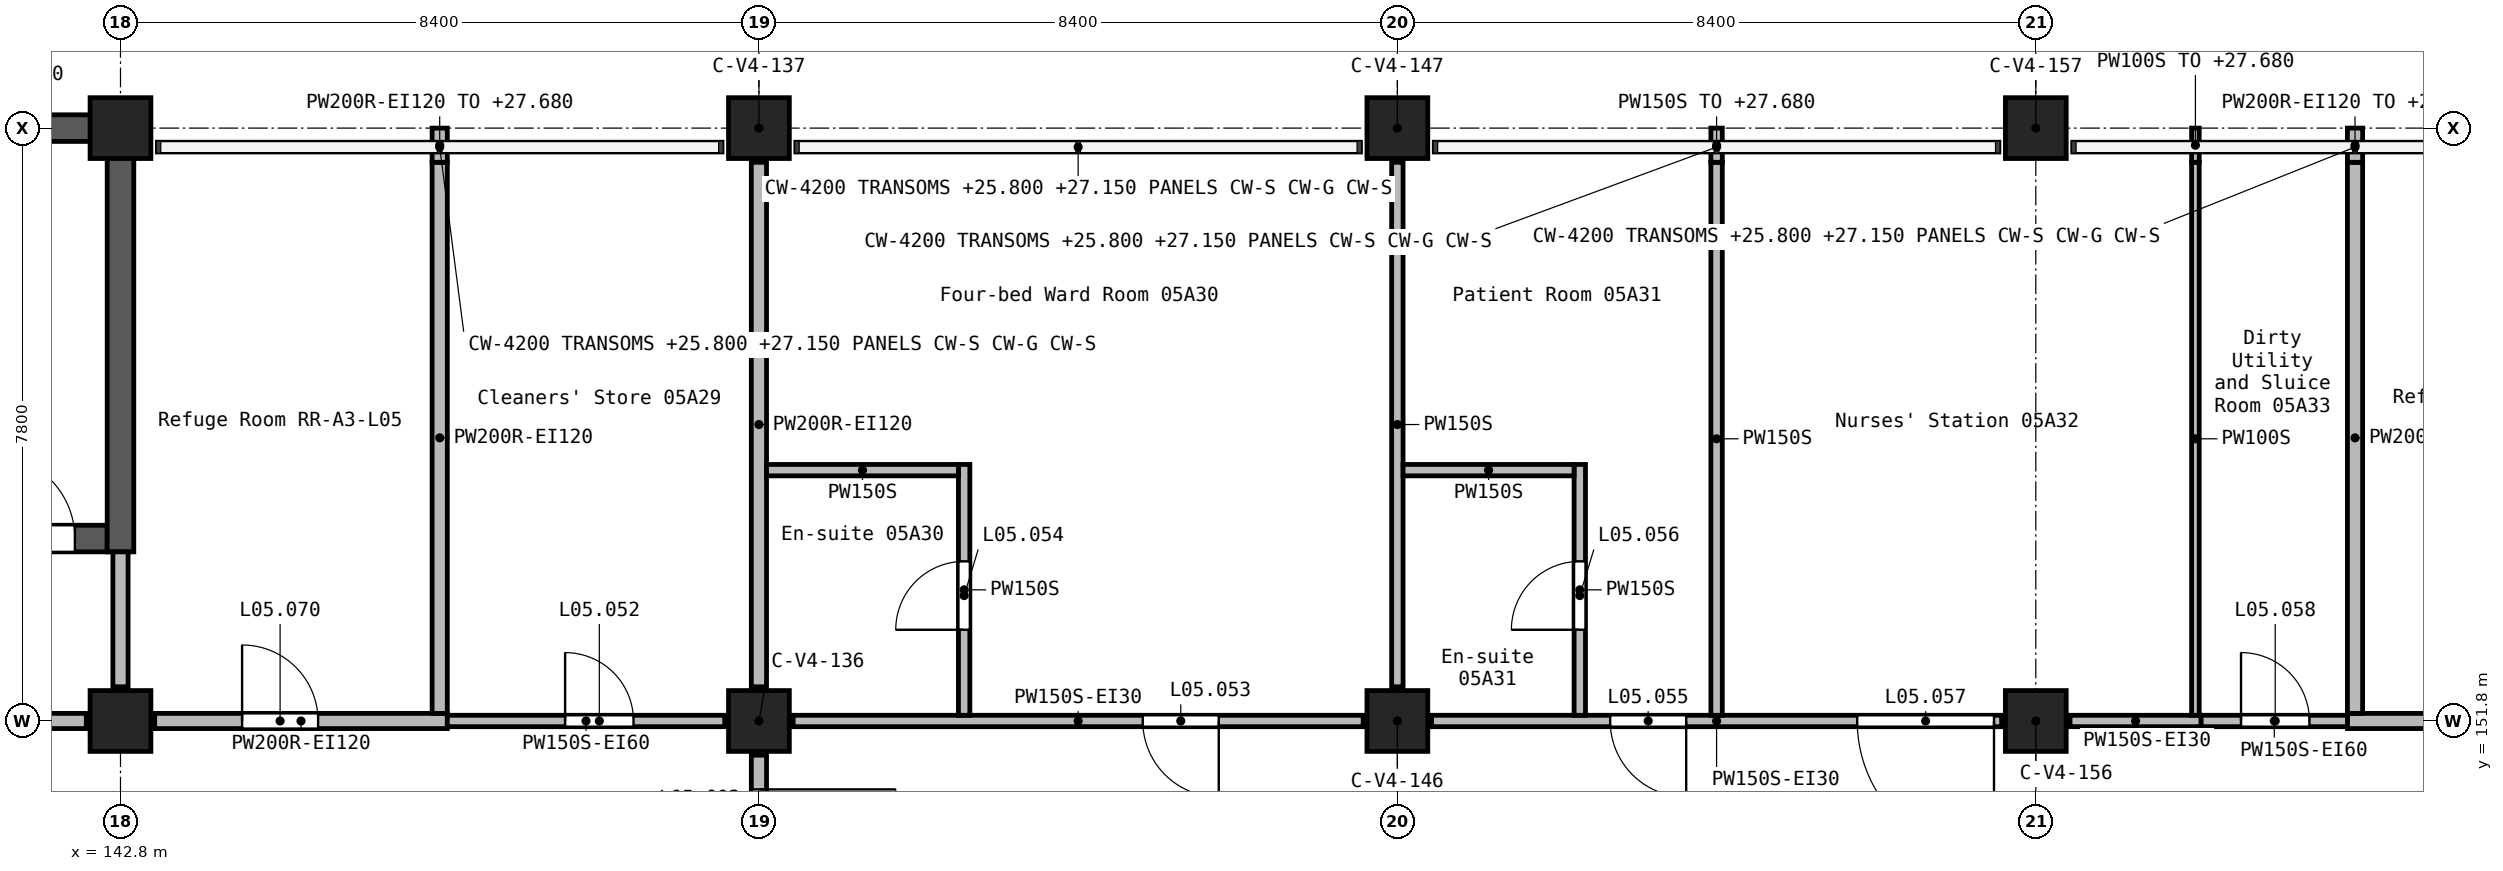
"""IFC4 building model, lengths in metres.
Left out: names, types, materials, properties, quantities, classifications, styles, units other than length and angle.
Written with IfcOpenShell. Run it as: python <this file> out.ifc"""

import sys

from ifc_helpers import new_model, si_unit, direction, frame, frame_2d, origin, origin_2d, place, context, subcontext, project, spatial, rectangle, extrude, element, fill, save


model = new_model("IFC4")
c1 = context("Model", 3, precision=1e-05, world=origin(), true_north=direction((0.0, 1.0)))
c2 = subcontext(c1, "Body", "Model", "MODEL_VIEW")
j1 = project(units=[si_unit("LENGTHUNIT", "METRE"), si_unit("PLANEANGLEUNIT", "RADIAN")], contexts=[c1])
p1 = place(None, origin())
s1 = spatial("IfcSite", under=j1, at=p1, CompositionType="ELEMENT")
p2 = place(p1, origin())
s2 = spatial("IfcBuilding", under=s1, at=p2, CompositionType="ELEMENT")
p3 = place(p2, frame((0.0, 0.0, 24.9)))
s3 = spatial("IfcBuildingStorey", under=s2, at=p3, CompositionType="ELEMENT", Elevation=24.9)
for number, where, z_axis, x_axis in (
    (1, (142.8, 151.8, 0.0), (0.0, 0.0, 1.0), (1.0, 0.0, 0.0)),
    (2, (142.8, 159.6, 0.0), (0.0, 0.0, 1.0), (1.0, 0.0, 0.0)),
    (3, (151.2, 151.8, 0.0), (0.0, 0.0, 1.0), (1.0, 0.0, 0.0)),
    (4, (151.2, 159.6, 0.0), (0.0, 0.0, 1.0), (1.0, 0.0, 0.0)),
    (5, (159.6, 151.8, 0.0), (0.0, 0.0, 1.0), (1.0, 0.0, 0.0)),
    (6, (159.6, 159.6, 0.0), (0.0, 0.0, 1.0), (1.0, 0.0, 0.0)),
    (7, (168.0, 151.8, 0.0), (0.0, 0.0, 1.0), (1.0, 0.0, 0.0)),
    (8, (168.0, 159.6, 0.0), (0.0, 0.0, 1.0), (1.0, 0.0, 0.0)),
):
    element("IfcColumn", number, at=place(p3, frame(where, z_axis=z_axis, x_axis=x_axis)), inside=s3, PredefinedType="COLUMN", context=c2, shape_type="SweptSolid", body=[
        extrude(rectangle(XDim=0.8, YDim=0.8, at=origin_2d()), origin(), (0.0, 0.0, 1.0), 3.9),
    ])
p4 = place(p3, frame((134.225, 159.6, 0.0), z_axis=(0.0, 0.0, 1.0), x_axis=(1.0, 0.0, 0.0)))
e9 = element("IfcWall", 9, at=p4, inside=s3, PredefinedType="SHEAR", context=c2, shape_type="SweptSolid", body=[
    extrude(rectangle(XDim=8.4, YDim=0.35, at=frame_2d((4.2, 0.0))), origin(), (0.0, 0.0, 1.0), 3.9),
])
p5 = place(p3, frame((134.575, 154.2, 0.0), z_axis=(0.0, 0.0, 1.0), x_axis=(1.0, 0.0, 0.0)))
e10 = element("IfcWall", 10, at=p5, inside=s3, PredefinedType="SHEAR", context=c2, shape_type="SweptSolid", body=[
    extrude(rectangle(XDim=8.05, YDim=0.35, at=frame_2d((4.025, 0.0))), origin(), (0.0, 0.0, 1.0), 3.9),
])
p6 = place(p5, frame((6.525, 0.0, 0.0)))
e11 = element("IfcOpeningElement", 11, at=p6, cuts=e10, PredefinedType="OPENING", context=c2, shape_type="SweptSolid", body=[
    extrude(rectangle(XDim=1.1, YDim=2.1, at=frame_2d((0.55, 1.05))), frame((0.0, 0.185, 0.0), z_axis=(0.0, -1.0, 0.0), x_axis=(1.0, 0.0, 0.0)), (0.0, 0.0, 1.0), 0.37),
])
p7 = place(p3, frame((142.8, 154.025, 0.0), z_axis=(0.0, 0.0, 1.0), x_axis=(0.0, 1.0, 0.0)))
e12 = element("IfcWall", 12, at=p7, inside=s3, PredefinedType="SHEAR", context=c2, shape_type="SweptSolid", body=[
    extrude(rectangle(XDim=5.75, YDim=0.35, at=frame_2d((2.875, 0.0))), origin(), (0.0, 0.0, 1.0), 3.9),
])
p8 = place(p3, frame((151.2, 159.15, 0.0), z_axis=(0.0, 0.0, 1.0), x_axis=(0.0, -1.0, 0.0)))
e13 = element("IfcWall", 13, at=p8, inside=s3, PredefinedType="SOLIDWALL", context=c2, shape_type="SweptSolid", body=[
    extrude(rectangle(XDim=6.9, YDim=0.2, at=frame_2d((3.45, 0.0))), origin(), (0.0, 0.0, 1.0), 3.6),
])
p9 = place(p3, frame((151.2, 151.35, 0.0), z_axis=(0.0, 0.0, 1.0), x_axis=(0.0, -1.0, 0.0)))
e14 = element("IfcWall", 14, at=p9, inside=s3, PredefinedType="SOLIDWALL", context=c2, shape_type="SweptSolid", body=[
    extrude(rectangle(XDim=2.7, YDim=0.2, at=frame_2d((1.35, 0.0))), origin(), (0.0, 0.0, 1.0), 3.6),
])
p10 = place(p9, frame((0.45, 0.0, 0.0)))
e15 = element("IfcOpeningElement", 15, at=p10, cuts=e14, PredefinedType="OPENING", context=c2, shape_type="SweptSolid", body=[
    extrude(rectangle(XDim=1.8, YDim=2.1, at=frame_2d((0.9, 1.05))), frame((0.0, 0.11, 0.0), z_axis=(0.0, -1.0, 0.0), x_axis=(1.0, 0.0, 0.0)), (0.0, 0.0, 1.0), 0.22),
])
p11 = place(p3, frame((172.1, 151.8, 0.0), z_axis=(0.0, 0.0, 1.0), x_axis=(1.0, 0.0, 0.0)))
e16 = element("IfcWall", 16, at=p11, inside=s3, PredefinedType="SOLIDWALL", context=c2, shape_type="SweptSolid", body=[
    extrude(rectangle(XDim=3.85, YDim=0.2, at=frame_2d((1.925, 0.0))), origin(), (0.0, 0.0, 1.0), 3.6),
])
p12 = place(p11, frame((1.7, 0.0, 0.0)))
e17 = element("IfcOpeningElement", 17, at=p12, cuts=e16, PredefinedType="OPENING", context=c2, shape_type="SweptSolid", body=[
    extrude(rectangle(XDim=1.0, YDim=2.1, at=frame_2d((0.5, 1.05))), frame((0.0, 0.11, 0.0), z_axis=(0.0, -1.0, 0.0), x_axis=(1.0, 0.0, 0.0)), (0.0, 0.0, 1.0), 0.22),
])
p13 = place(p3, frame((134.85, 151.8, 0.0), z_axis=(0.0, 0.0, 1.0), x_axis=(1.0, 0.0, 0.0)))
e18 = element("IfcWall", 18, at=p13, inside=s3, PredefinedType="SOLIDWALL", context=c2, shape_type="SweptSolid", body=[
    extrude(rectangle(XDim=7.5, YDim=0.2, at=frame_2d((3.75, 0.0))), origin(), (0.0, 0.0, 1.0), 3.6),
])
p14 = place(p13, frame((3.2, 0.0, 0.0)))
e19 = element("IfcOpeningElement", 19, at=p14, cuts=e18, PredefinedType="OPENING", context=c2, shape_type="SweptSolid", body=[
    extrude(rectangle(XDim=1.1, YDim=2.1, at=frame_2d((0.55, 1.05))), frame((0.0, 0.11, 0.0), z_axis=(0.0, -1.0, 0.0), x_axis=(1.0, 0.0, 0.0)), (0.0, 0.0, 1.0), 0.22),
])
p15 = place(p3, frame((143.25, 151.8, 0.0), z_axis=(0.0, 0.0, 1.0), x_axis=(1.0, 0.0, 0.0)))
e20 = element("IfcWall", 20, at=p15, inside=s3, PredefinedType="SOLIDWALL", context=c2, shape_type="SweptSolid", body=[
    extrude(rectangle(XDim=3.85, YDim=0.2, at=frame_2d((1.925, 0.0))), origin(), (0.0, 0.0, 1.0), 3.6),
])
p16 = place(p15, frame((1.15, 0.0, 0.0)))
e21 = element("IfcOpeningElement", 21, at=p16, cuts=e20, PredefinedType="OPENING", context=c2, shape_type="SweptSolid", body=[
    extrude(rectangle(XDim=1.0, YDim=2.1, at=frame_2d((0.5, 1.05))), frame((0.0, 0.11, 0.0), z_axis=(0.0, -1.0, 0.0), x_axis=(1.0, 0.0, 0.0)), (0.0, 0.0, 1.0), 0.22),
])
p17 = place(p3, frame((142.8, 152.25, 0.0), z_axis=(0.0, 0.0, 1.0), x_axis=(0.0, 1.0, 0.0)))
e22 = element("IfcWall", 22, at=p17, inside=s3, PredefinedType="SOLIDWALL", context=c2, shape_type="SweptSolid", body=[
    extrude(rectangle(XDim=1.775, YDim=0.2, at=frame_2d((0.887, 0.0))), origin(), (0.0, 0.0, 1.0), 3.6),
])
p18 = place(p3, frame((147.0, 151.9, 0.0), z_axis=(0.0, 0.0, 1.0), x_axis=(0.0, 1.0, 0.0)))
e23 = element("IfcWall", 23, at=p18, inside=s3, PredefinedType="SOLIDWALL", context=c2, shape_type="SweptSolid", body=[
    extrude(rectangle(XDim=7.25, YDim=0.2, at=frame_2d((3.625, 0.0))), origin(), (0.0, 0.0, 1.0), 3.6),
])
p19 = place(p3, frame((147.0, 159.15, 0.0), z_axis=(0.0, 0.0, 1.0), x_axis=(0.0, 1.0, 0.0)))
e24 = element("IfcWall", 24, at=p19, inside=s3, PredefinedType="SOLIDWALL", context=c2, shape_type="SweptSolid", body=[
    extrude(rectangle(XDim=0.45, YDim=0.2, at=frame_2d((0.225, 0.0))), origin(), (0.0, 0.0, 1.0), 2.78),
])
p20 = place(p3, frame((172.2, 151.9, 0.0), z_axis=(0.0, 0.0, 1.0), x_axis=(0.0, 1.0, 0.0)))
e25 = element("IfcWall", 25, at=p20, inside=s3, PredefinedType="SOLIDWALL", context=c2, shape_type="SweptSolid", body=[
    extrude(rectangle(XDim=7.25, YDim=0.2, at=frame_2d((3.625, 0.0))), origin(), (0.0, 0.0, 1.0), 3.6),
])
p21 = place(p3, frame((172.2, 159.15, 0.0), z_axis=(0.0, 0.0, 1.0), x_axis=(0.0, 1.0, 0.0)))
e26 = element("IfcWall", 26, at=p21, inside=s3, PredefinedType="SOLIDWALL", context=c2, shape_type="SweptSolid", body=[
    extrude(rectangle(XDim=0.45, YDim=0.2, at=frame_2d((0.225, 0.0))), origin(), (0.0, 0.0, 1.0), 2.78),
])
p22 = place(p3, frame((170.175, 151.8, 0.0), z_axis=(0.0, 0.0, 1.0), x_axis=(-1.0, 0.0, 0.0)))
e27 = element("IfcWall", 27, at=p22, inside=s3, PredefinedType="PARTITIONING", context=c2, shape_type="SweptSolid", body=[
    extrude(rectangle(XDim=1.725, YDim=0.15, at=frame_2d((0.863, 0.0))), origin(), (0.0, 0.0, 1.0), 3.6),
])
p23 = place(p3, frame((167.55, 151.8, 0.0), z_axis=(0.0, 0.0, 1.0), x_axis=(-1.0, 0.0, 0.0)))
e28 = element("IfcWall", 28, at=p23, inside=s3, PredefinedType="PARTITIONING", context=c2, shape_type="SweptSolid", body=[
    extrude(rectangle(XDim=7.5, YDim=0.15, at=frame_2d((3.75, 0.0))), origin(), (0.0, 0.0, 1.0), 3.6),
])
p24 = place(p23, frame((4.15, 0.0, 0.0)))
e29 = element("IfcOpeningElement", 29, at=p24, cuts=e28, PredefinedType="OPENING", context=c2, shape_type="SweptSolid", body=[
    extrude(rectangle(XDim=1.0, YDim=2.1, at=frame_2d((0.5, 1.05))), frame((0.0, 0.085, 0.0), z_axis=(0.0, -1.0, 0.0), x_axis=(1.0, 0.0, 0.0)), (0.0, 0.0, 1.0), 0.17),
])
p25 = place(p23, frame((0.1, 0.0, 0.0)))
e30 = element("IfcOpeningElement", 30, at=p25, cuts=e28, PredefinedType="OPENING", context=c2, shape_type="SweptSolid", body=[
    extrude(rectangle(XDim=1.8, YDim=2.1, at=frame_2d((0.9, 1.05))), frame((0.0, 0.085, 0.0), z_axis=(0.0, -1.0, 0.0), x_axis=(1.0, 0.0, 0.0)), (0.0, 0.0, 1.0), 0.17),
])
p26 = place(p3, frame((159.15, 151.8, 0.0), z_axis=(0.0, 0.0, 1.0), x_axis=(-1.0, 0.0, 0.0)))
e31 = element("IfcWall", 31, at=p26, inside=s3, PredefinedType="PARTITIONING", context=c2, shape_type="SweptSolid", body=[
    extrude(rectangle(XDim=7.5, YDim=0.15, at=frame_2d((3.75, 0.0))), origin(), (0.0, 0.0, 1.0), 3.6),
])
p27 = place(p26, frame((1.9, 0.0, 0.0)))
e32 = element("IfcOpeningElement", 32, at=p27, cuts=e31, PredefinedType="OPENING", context=c2, shape_type="SweptSolid", body=[
    extrude(rectangle(XDim=1.0, YDim=2.1, at=frame_2d((0.5, 1.05))), frame((0.0, 0.085, 0.0), z_axis=(0.0, -1.0, 0.0), x_axis=(1.0, 0.0, 0.0)), (0.0, 0.0, 1.0), 0.17),
])
p28 = place(p3, frame((147.1, 151.8, 0.0), z_axis=(0.0, 0.0, 1.0), x_axis=(1.0, 0.0, 0.0)))
e33 = element("IfcWall", 33, at=p28, inside=s3, PredefinedType="PARTITIONING", context=c2, shape_type="SweptSolid", body=[
    extrude(rectangle(XDim=3.65, YDim=0.15, at=frame_2d((1.825, 0.0))), origin(), (0.0, 0.0, 1.0), 3.6),
])
p29 = place(p28, frame((1.55, 0.0, 0.0)))
e34 = element("IfcOpeningElement", 34, at=p29, cuts=e33, PredefinedType="OPENING", context=c2, shape_type="SweptSolid", body=[
    extrude(rectangle(XDim=0.9, YDim=2.1, at=frame_2d((0.45, 1.05))), frame((0.0, 0.085, 0.0), z_axis=(0.0, -1.0, 0.0), x_axis=(1.0, 0.0, 0.0)), (0.0, 0.0, 1.0), 0.17),
])
p30 = place(p3, frame((170.175, 151.8, 0.0), z_axis=(0.0, 0.0, 1.0), x_axis=(1.0, 0.0, 0.0)))
e35 = element("IfcWall", 35, at=p30, inside=s3, PredefinedType="PARTITIONING", context=c2, shape_type="SweptSolid", body=[
    extrude(rectangle(XDim=1.925, YDim=0.15, at=frame_2d((0.962, 0.0))), origin(), (0.0, 0.0, 1.0), 3.6),
])
p31 = place(p30, frame((0.525, 0.0, 0.0)))
e36 = element("IfcOpeningElement", 36, at=p31, cuts=e35, PredefinedType="OPENING", context=c2, shape_type="SweptSolid", body=[
    extrude(rectangle(XDim=0.9, YDim=2.1, at=frame_2d((0.45, 1.05))), frame((0.0, 0.085, 0.0), z_axis=(0.0, -1.0, 0.0), x_axis=(1.0, 0.0, 0.0)), (0.0, 0.0, 1.0), 0.17),
])
p32 = place(p3, frame((159.6, 152.25, 0.0), z_axis=(0.0, 0.0, 1.0), x_axis=(0.0, 1.0, 0.0)))
e37 = element("IfcWall", 37, at=p32, inside=s3, PredefinedType="PARTITIONING", context=c2, shape_type="SweptSolid", body=[
    extrude(rectangle(XDim=6.9, YDim=0.15, at=frame_2d((3.45, 0.0))), origin(), (0.0, 0.0, 1.0), 3.6),
])
p33 = place(p3, frame((163.8, 151.875, 0.0), z_axis=(0.0, 0.0, 1.0), x_axis=(0.0, 1.0, 0.0)))
e38 = element("IfcWall", 38, at=p33, inside=s3, PredefinedType="PARTITIONING", context=c2, shape_type="SweptSolid", body=[
    extrude(rectangle(XDim=7.275, YDim=0.15, at=frame_2d((3.637, 0.0))), origin(), (0.0, 0.0, 1.0), 3.6),
])
p34 = place(p3, frame((163.8, 159.15, 0.0), z_axis=(0.0, 0.0, 1.0), x_axis=(0.0, 1.0, 0.0)))
e39 = element("IfcWall", 39, at=p34, inside=s3, PredefinedType="PARTITIONING", context=c2, shape_type="SweptSolid", body=[
    extrude(rectangle(XDim=0.45, YDim=0.15, at=frame_2d((0.225, 0.0))), origin(), (0.0, 0.0, 1.0), 2.78),
])
p35 = place(p3, frame((153.9, 151.875, 0.0), z_axis=(0.0, 0.0, 1.0), x_axis=(0.0, 1.0, 0.0)))
e40 = element("IfcWall", 40, at=p35, inside=s3, PredefinedType="PARTITIONING", context=c2, shape_type="SweptSolid", body=[
    extrude(rectangle(XDim=3.3, YDim=0.15, at=frame_2d((1.65, 0.0))), origin(), (0.0, 0.0, 1.0), 3.6),
])
p36 = place(p35, frame((1.125, 0.0, 0.0)))
e41 = element("IfcOpeningElement", 41, at=p36, cuts=e40, PredefinedType="OPENING", context=c2, shape_type="SweptSolid", body=[
    extrude(rectangle(XDim=0.9, YDim=2.1, at=frame_2d((0.45, 1.05))), frame((0.0, 0.085, 0.0), z_axis=(0.0, -1.0, 0.0), x_axis=(1.0, 0.0, 0.0)), (0.0, 0.0, 1.0), 0.17),
])
p37 = place(p3, frame((162.0, 151.875, 0.0), z_axis=(0.0, 0.0, 1.0), x_axis=(0.0, 1.0, 0.0)))
e42 = element("IfcWall", 42, at=p37, inside=s3, PredefinedType="PARTITIONING", context=c2, shape_type="SweptSolid", body=[
    extrude(rectangle(XDim=3.3, YDim=0.15, at=frame_2d((1.65, 0.0))), origin(), (0.0, 0.0, 1.0), 3.6),
])
p38 = place(p37, frame((1.125, 0.0, 0.0)))
e43 = element("IfcOpeningElement", 43, at=p38, cuts=e42, PredefinedType="OPENING", context=c2, shape_type="SweptSolid", body=[
    extrude(rectangle(XDim=0.9, YDim=2.1, at=frame_2d((0.45, 1.05))), frame((0.0, 0.085, 0.0), z_axis=(0.0, -1.0, 0.0), x_axis=(1.0, 0.0, 0.0)), (0.0, 0.0, 1.0), 0.17),
])
p39 = place(p3, frame((151.3, 155.1, 0.0), z_axis=(0.0, 0.0, 1.0), x_axis=(1.0, 0.0, 0.0)))
e44 = element("IfcWall", 44, at=p39, inside=s3, PredefinedType="PARTITIONING", context=c2, shape_type="SweptSolid", body=[
    extrude(rectangle(XDim=2.525, YDim=0.15, at=frame_2d((1.262, 0.0))), origin(), (0.0, 0.0, 1.0), 3.6),
])
p40 = place(p3, frame((159.675, 155.1, 0.0), z_axis=(0.0, 0.0, 1.0), x_axis=(1.0, 0.0, 0.0)))
e45 = element("IfcWall", 45, at=p40, inside=s3, PredefinedType="PARTITIONING", context=c2, shape_type="SweptSolid", body=[
    extrude(rectangle(XDim=2.25, YDim=0.15, at=frame_2d((1.125, 0.0))), origin(), (0.0, 0.0, 1.0), 3.6),
])
p41 = place(p3, frame((170.1, 151.875, 0.0), z_axis=(0.0, 0.0, 1.0), x_axis=(0.0, 1.0, 0.0)))
e46 = element("IfcWall", 46, at=p41, inside=s3, PredefinedType="PARTITIONING", context=c2, shape_type="SweptSolid", body=[
    extrude(rectangle(XDim=7.275, YDim=0.1, at=frame_2d((3.637, 0.0))), origin(), (0.0, 0.0, 1.0), 3.6),
])
p42 = place(p3, frame((170.1, 159.15, 0.0), z_axis=(0.0, 0.0, 1.0), x_axis=(0.0, 1.0, 0.0)))
e47 = element("IfcWall", 47, at=p42, inside=s3, PredefinedType="PARTITIONING", context=c2, shape_type="SweptSolid", body=[
    extrude(rectangle(XDim=0.45, YDim=0.1, at=frame_2d((0.225, 0.0))), origin(), (0.0, 0.0, 1.0), 2.78),
])
p43 = place(p10, origin())
e48 = element("IfcDoor", 48, at=p43, inside=s3, OperationType="DOUBLE_DOOR_SINGLE_SWING", PredefinedType="DOOR", context=c2, shape_type="SweptSolid", body=[
    extrude(rectangle(XDim=1.8, YDim=2.1, at=frame_2d((0.9, 1.05))), frame((0.0, 0.025, 0.0), z_axis=(0.0, -1.0, 0.0), x_axis=(1.0, 0.0, 0.0)), (0.0, 0.0, 1.0), 0.05),
])
fill(e15, e48)
p44 = place(p29, origin())
e49 = element("IfcDoor", 49, at=p44, inside=s3, OperationType="SINGLE_SWING_RIGHT", PredefinedType="DOOR", context=c2, shape_type="SweptSolid", body=[
    extrude(rectangle(XDim=0.9, YDim=2.1, at=frame_2d((0.45, 1.05))), frame((0.0, 0.025, 0.0), z_axis=(0.0, -1.0, 0.0), x_axis=(1.0, 0.0, 0.0)), (0.0, 0.0, 1.0), 0.05),
])
fill(e34, e49)
p45 = place(p27, frame((1.0, 0.0, 0.0), z_axis=(0.0, 0.0, 1.0), x_axis=(-1.0, 0.0, 0.0)))
e50 = element("IfcDoor", 50, at=p45, inside=s3, OperationType="SINGLE_SWING_RIGHT", PredefinedType="DOOR", context=c2, shape_type="SweptSolid", body=[
    extrude(rectangle(XDim=1.0, YDim=2.1, at=frame_2d((0.5, 1.05))), frame((0.0, 0.025, 0.0), z_axis=(0.0, -1.0, 0.0), x_axis=(1.0, 0.0, 0.0)), (0.0, 0.0, 1.0), 0.05),
])
fill(e32, e50)
p46 = place(p36, origin())
e51 = element("IfcDoor", 51, at=p46, inside=s3, OperationType="SINGLE_SWING_LEFT", PredefinedType="DOOR", context=c2, shape_type="SweptSolid", body=[
    extrude(rectangle(XDim=0.9, YDim=2.1, at=frame_2d((0.45, 1.05))), frame((0.0, 0.025, 0.0), z_axis=(0.0, -1.0, 0.0), x_axis=(1.0, 0.0, 0.0)), (0.0, 0.0, 1.0), 0.05),
])
fill(e41, e51)
p47 = place(p24, frame((1.0, 0.0, 0.0), z_axis=(0.0, 0.0, 1.0), x_axis=(-1.0, 0.0, 0.0)))
e52 = element("IfcDoor", 52, at=p47, inside=s3, OperationType="SINGLE_SWING_LEFT", PredefinedType="DOOR", context=c2, shape_type="SweptSolid", body=[
    extrude(rectangle(XDim=1.0, YDim=2.1, at=frame_2d((0.5, 1.05))), frame((0.0, 0.025, 0.0), z_axis=(0.0, -1.0, 0.0), x_axis=(1.0, 0.0, 0.0)), (0.0, 0.0, 1.0), 0.05),
])
fill(e29, e52)
p48 = place(p38, origin())
e53 = element("IfcDoor", 53, at=p48, inside=s3, OperationType="SINGLE_SWING_LEFT", PredefinedType="DOOR", context=c2, shape_type="SweptSolid", body=[
    extrude(rectangle(XDim=0.9, YDim=2.1, at=frame_2d((0.45, 1.05))), frame((0.0, 0.025, 0.0), z_axis=(0.0, -1.0, 0.0), x_axis=(1.0, 0.0, 0.0)), (0.0, 0.0, 1.0), 0.05),
])
fill(e43, e53)
p49 = place(p25, frame((1.8, 0.0, 0.0), z_axis=(0.0, 0.0, 1.0), x_axis=(-1.0, 0.0, 0.0)))
e54 = element("IfcDoor", 54, at=p49, inside=s3, OperationType="DOUBLE_DOOR_SINGLE_SWING", PredefinedType="DOOR", context=c2, shape_type="SweptSolid", body=[
    extrude(rectangle(XDim=1.8, YDim=2.1, at=frame_2d((0.9, 1.05))), frame((0.0, 0.025, 0.0), z_axis=(0.0, -1.0, 0.0), x_axis=(1.0, 0.0, 0.0)), (0.0, 0.0, 1.0), 0.05),
])
fill(e30, e54)
p50 = place(p31, origin())
e55 = element("IfcDoor", 55, at=p50, inside=s3, OperationType="SINGLE_SWING_RIGHT", PredefinedType="DOOR", context=c2, shape_type="SweptSolid", body=[
    extrude(rectangle(XDim=0.9, YDim=2.1, at=frame_2d((0.45, 1.05))), frame((0.0, 0.025, 0.0), z_axis=(0.0, -1.0, 0.0), x_axis=(1.0, 0.0, 0.0)), (0.0, 0.0, 1.0), 0.05),
])
fill(e36, e55)
p51 = place(p16, origin())
e56 = element("IfcDoor", 56, at=p51, inside=s3, OperationType="SINGLE_SWING_LEFT", PredefinedType="DOOR", context=c2, shape_type="SweptSolid", body=[
    extrude(rectangle(XDim=1.0, YDim=2.1, at=frame_2d((0.5, 1.05))), frame((0.0, 0.025, 0.0), z_axis=(0.0, -1.0, 0.0), x_axis=(1.0, 0.0, 0.0)), (0.0, 0.0, 1.0), 0.05),
])
fill(e21, e56)
p52 = place(p6, origin())
e57 = element("IfcDoor", 57, at=p52, inside=s3, OperationType="SINGLE_SWING_RIGHT", PredefinedType="DOOR", context=c2, shape_type="SweptSolid", body=[
    extrude(rectangle(XDim=1.1, YDim=2.1, at=frame_2d((0.55, 1.05))), frame((0.0, 0.025, 0.0), z_axis=(0.0, -1.0, 0.0), x_axis=(1.0, 0.0, 0.0)), (0.0, 0.0, 1.0), 0.05),
])
fill(e11, e57)
save(model, sys.argv[1])
